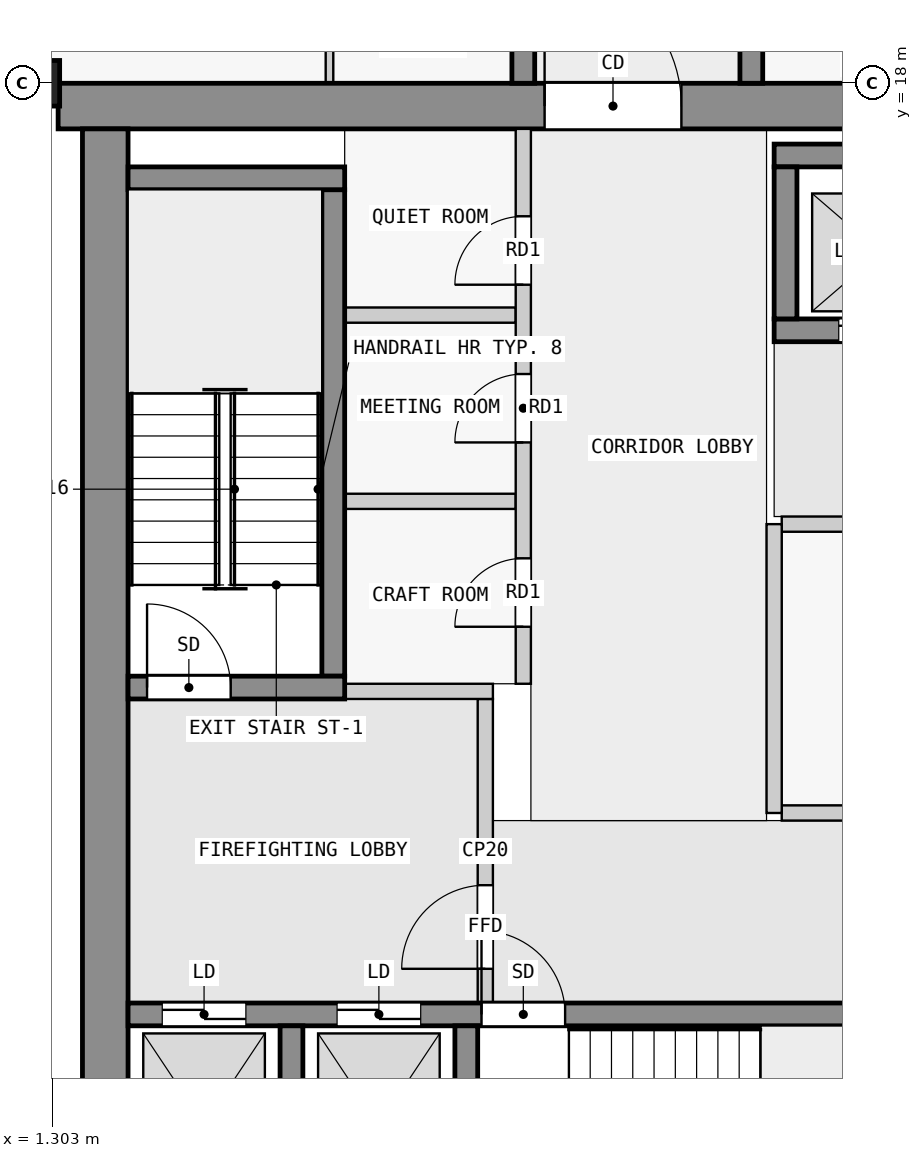
"""IFC4 building model, lengths in metres.
Left out: names, types, materials, properties, quantities, classifications, styles, units other than length and angle.
Written with IfcOpenShell. Run it as: python <this file> out.ifc"""

import sys

from ifc_helpers import new_model, si_unit, direction, frame, frame_2d, origin, origin_2d, place, context, subcontext, project, spatial, rectangle, extrude, element, fill, save


model = new_model("IFC4")
c1 = context("Model", 3, precision=1e-05, world=origin(), true_north=direction((0.0, 1.0)))
c2 = subcontext(c1, "Body", "Model", "MODEL_VIEW")
j1 = project(units=[si_unit("LENGTHUNIT", "METRE"), si_unit("PLANEANGLEUNIT", "RADIAN")], contexts=[c1])
p1 = place(None, origin())
s1 = spatial("IfcSite", under=j1, at=p1, CompositionType="ELEMENT")
p2 = place(p1, origin())
s2 = spatial("IfcBuilding", under=s1, at=p2, CompositionType="ELEMENT")
p3 = place(p2, frame((0.0, 0.0, 156.9)))
s3 = spatial("IfcBuildingStorey", under=s2, at=p3, CompositionType="ELEMENT", Elevation=156.9)
p4 = place(p3, frame((0.7, 18.0, 0.0), z_axis=(0.0, 0.0, 1.0), x_axis=(0.0, 1.0, 0.0)))
e1 = element("IfcColumn", 1, at=p4, inside=s3, PredefinedType="COLUMN", context=c2, shape_type="SweptSolid", body=[
    extrude(rectangle(XDim=0.6, YDim=1.4, at=origin_2d()), origin(), (0.0, 0.0, 1.0), 3.5),
])
p5 = place(p3, frame((1.38, 17.7, 0.0), z_axis=(0.0, 0.0, 1.0), x_axis=(1.0, 0.0, 0.0)))
e2 = element("IfcWall", 2, at=p5, inside=s3, PredefinedType="SHEAR", context=c2, shape_type="SweptSolid", body=[
    extrude(rectangle(XDim=21.12, YDim=0.6, at=frame_2d((10.56, 0.0))), origin(), (0.0, 0.0, 1.0), 3.25),
])
p6 = place(p5, frame((6.4, 0.0, 0.0)))
e3 = element("IfcOpeningElement", 3, at=p6, cuts=e2, PredefinedType="OPENING", context=c2, shape_type="SweptSolid", body=[
    extrude(rectangle(XDim=1.8, YDim=2.1, at=frame_2d((0.9, 1.05))), frame((0.0, 0.31, 0.0), z_axis=(0.0, -1.0, 0.0), x_axis=(1.0, 0.0, 0.0)), (0.0, 0.0, 1.0), 0.62),
])
p7 = place(p3, frame((2.0, 2.5, 0.0), z_axis=(0.0, 0.0, 1.0), x_axis=(0.0, 1.0, 0.0)))
e4 = element("IfcWall", 4, at=p7, inside=s3, PredefinedType="SHEAR", context=c2, shape_type="SweptSolid", body=[
    extrude(rectangle(XDim=14.9, YDim=0.6, at=frame_2d((7.45, 0.0))), origin(), (0.0, 0.0, 1.0), 3.25),
])
for number, where, z_axis, x_axis in (
    (5, (4.45, 2.8, 0.0), (0.0, 0.0, 1.0), (0.0, 1.0, 0.0)),
    (6, (6.75, 2.8, 0.0), (0.0, 0.0, 1.0), (0.0, 1.0, 0.0)),
):
    element("IfcWall", number, at=place(p3, frame(where, z_axis=z_axis, x_axis=x_axis)), inside=s3, PredefinedType="SHEAR", context=c2, shape_type="SweptSolid", body=[
        extrude(rectangle(XDim=2.8, YDim=0.3, at=frame_2d((1.4, 0.0))), origin(), (0.0, 0.0, 1.0), 3.25),
    ])
p8 = place(p3, frame((2.3, 5.75, 0.0), z_axis=(0.0, 0.0, 1.0), x_axis=(1.0, 0.0, 0.0)))
e7 = element("IfcWall", 7, at=p8, inside=s3, PredefinedType="SHEAR", context=c2, shape_type="SweptSolid", body=[
    extrude(rectangle(XDim=18.8, YDim=0.3, at=frame_2d((9.4, 0.0))), origin(), (0.0, 0.0, 1.0), 3.25),
])
p9 = place(p8, frame((4.65, 0.0, 0.0)))
e8 = element("IfcOpeningElement", 8, at=p9, cuts=e7, PredefinedType="OPENING", context=c2, shape_type="SweptSolid", body=[
    extrude(rectangle(XDim=1.1, YDim=2.1, at=frame_2d((0.55, 1.05))), frame((0.0, 0.16, 0.0), z_axis=(0.0, -1.0, 0.0), x_axis=(1.0, 0.0, 0.0)), (0.0, 0.0, 1.0), 0.32),
])
p10 = place(p8, frame((0.45, 0.0, 0.0)))
e9 = element("IfcOpeningElement", 9, at=p10, cuts=e7, PredefinedType="OPENING", context=c2, shape_type="SweptSolid", body=[
    extrude(rectangle(XDim=1.1, YDim=2.1, at=frame_2d((0.55, 1.05))), frame((0.0, 0.16, 0.0), z_axis=(0.0, -1.0, 0.0), x_axis=(1.0, 0.0, 0.0)), (0.0, 0.0, 1.0), 0.32),
])
p11 = place(p8, frame((2.75, 0.0, 0.0)))
e10 = element("IfcOpeningElement", 10, at=p11, cuts=e7, PredefinedType="OPENING", context=c2, shape_type="SweptSolid", body=[
    extrude(rectangle(XDim=1.1, YDim=2.1, at=frame_2d((0.55, 1.05))), frame((0.0, 0.16, 0.0), z_axis=(0.0, -1.0, 0.0), x_axis=(1.0, 0.0, 0.0)), (0.0, 0.0, 1.0), 0.32),
])
p12 = place(p8, frame((14.45, 0.0, 0.0)))
e11 = element("IfcOpeningElement", 11, at=p12, cuts=e7, PredefinedType="OPENING", context=c2, shape_type="SweptSolid", body=[
    extrude(rectangle(XDim=0.9, YDim=2.1, at=frame_2d((0.45, 1.05))), frame((0.0, 0.16, 0.0), z_axis=(0.0, -1.0, 0.0), x_axis=(1.0, 0.0, 0.0)), (0.0, 0.0, 1.0), 0.32),
])
p13 = place(p3, frame((2.3, 10.05, 0.0), z_axis=(0.0, 0.0, 1.0), x_axis=(1.0, 0.0, 0.0)))
e12 = element("IfcWall", 12, at=p13, inside=s3, PredefinedType="SHEAR", context=c2, shape_type="SweptSolid", body=[
    extrude(rectangle(XDim=2.85, YDim=0.3, at=frame_2d((1.425, 0.0))), origin(), (0.0, 0.0, 1.0), 3.25),
])
p14 = place(p13, frame((0.25, 0.0, 0.0)))
e13 = element("IfcOpeningElement", 13, at=p14, cuts=e12, PredefinedType="OPENING", context=c2, shape_type="SweptSolid", body=[
    extrude(rectangle(XDim=1.1, YDim=2.1, at=frame_2d((0.55, 1.05))), frame((0.0, 0.16, 0.0), z_axis=(0.0, -1.0, 0.0), x_axis=(1.0, 0.0, 0.0)), (0.0, 0.0, 1.0), 0.32),
])
p15 = place(p3, frame((5.0, 10.2, 0.0), z_axis=(0.0, 0.0, 1.0), x_axis=(0.0, 1.0, 0.0)))
e14 = element("IfcWall", 14, at=p15, inside=s3, PredefinedType="SHEAR", context=c2, shape_type="SweptSolid", body=[
    extrude(rectangle(XDim=6.4, YDim=0.3, at=frame_2d((3.2, 0.0))), origin(), (0.0, 0.0, 1.0), 3.25),
])
p16 = place(p3, frame((2.3, 16.75, 0.0), z_axis=(0.0, 0.0, 1.0), x_axis=(1.0, 0.0, 0.0)))
e15 = element("IfcWall", 15, at=p16, inside=s3, PredefinedType="SHEAR", context=c2, shape_type="SweptSolid", body=[
    extrude(rectangle(XDim=2.85, YDim=0.3, at=frame_2d((1.425, 0.0))), origin(), (0.0, 0.0, 1.0), 3.25),
])
p17 = place(p3, frame((10.8, 17.05, 0.0), z_axis=(0.0, 0.0, 1.0), x_axis=(1.0, 0.0, 0.0)))
e16 = element("IfcWall", 16, at=p17, inside=s3, PredefinedType="SHEAR", context=c2, shape_type="SweptSolid", body=[
    extrude(rectangle(XDim=7.8, YDim=0.3, at=frame_2d((3.9, 0.0))), origin(), (0.0, 0.0, 1.0), 3.25),
])
p18 = place(p3, frame((10.8, 14.75, 0.0), z_axis=(0.0, 0.0, 1.0), x_axis=(1.0, 0.0, 0.0)))
e17 = element("IfcWall", 17, at=p18, inside=s3, PredefinedType="SHEAR", context=c2, shape_type="SweptSolid", body=[
    extrude(rectangle(XDim=7.8, YDim=0.3, at=frame_2d((3.9, 0.0))), origin(), (0.0, 0.0, 1.0), 3.25),
])
p19 = place(p18, frame((0.85, 0.0, 0.0)))
e18 = element("IfcOpeningElement", 18, at=p19, cuts=e17, PredefinedType="OPENING", context=c2, shape_type="SweptSolid", body=[
    extrude(rectangle(XDim=1.1, YDim=2.1, at=frame_2d((0.55, 1.05))), frame((0.0, 0.16, 0.0), z_axis=(0.0, -1.0, 0.0), x_axis=(1.0, 0.0, 0.0)), (0.0, 0.0, 1.0), 0.32),
])
p20 = place(p18, frame((3.35, 0.0, 0.0)))
e19 = element("IfcOpeningElement", 19, at=p20, cuts=e17, PredefinedType="OPENING", context=c2, shape_type="SweptSolid", body=[
    extrude(rectangle(XDim=1.1, YDim=2.1, at=frame_2d((0.55, 1.05))), frame((0.0, 0.16, 0.0), z_axis=(0.0, -1.0, 0.0), x_axis=(1.0, 0.0, 0.0)), (0.0, 0.0, 1.0), 0.32),
])
p21 = place(p18, frame((5.85, 0.0, 0.0)))
e20 = element("IfcOpeningElement", 20, at=p21, cuts=e17, PredefinedType="OPENING", context=c2, shape_type="SweptSolid", body=[
    extrude(rectangle(XDim=1.1, YDim=2.1, at=frame_2d((0.55, 1.05))), frame((0.0, 0.16, 0.0), z_axis=(0.0, -1.0, 0.0), x_axis=(1.0, 0.0, 0.0)), (0.0, 0.0, 1.0), 0.32),
])
p22 = place(p3, frame((10.95, 14.9, 0.0), z_axis=(0.0, 0.0, 1.0), x_axis=(0.0, 1.0, 0.0)))
e21 = element("IfcWall", 21, at=p22, inside=s3, PredefinedType="SHEAR", context=c2, shape_type="SweptSolid", body=[
    extrude(rectangle(XDim=2.0, YDim=0.3, at=frame_2d((1.0, 0.0))), origin(), (0.0, 0.0, 1.0), 3.25),
])
p23 = place(p3, frame((7.5, 18.0, 0.0), z_axis=(0.0, 0.0, 1.0), x_axis=(0.0, 1.0, 0.0)))
e22 = element("IfcWall", 22, at=p23, inside=s3, PredefinedType="SHEAR", context=c2, shape_type="SweptSolid", body=[
    extrude(rectangle(XDim=27.0, YDim=0.3, at=frame_2d((13.5, 0.0))), origin(), (0.0, 0.0, 1.0), 3.25),
])
p24 = place(p23, frame((1.75, 0.0, 0.0)))
e23 = element("IfcOpeningElement", 23, at=p24, cuts=e22, PredefinedType="OPENING", context=c2, shape_type="SweptSolid", body=[
    extrude(rectangle(XDim=1.0, YDim=2.1, at=frame_2d((0.5, 1.05))), frame((0.0, 0.16, 0.0), z_axis=(0.0, -1.0, 0.0), x_axis=(1.0, 0.0, 0.0)), (0.0, 0.0, 1.0), 0.32),
])
p25 = place(p23, frame((5.85, 0.0, 0.0)))
e24 = element("IfcOpeningElement", 24, at=p25, cuts=e22, PredefinedType="OPENING", context=c2, shape_type="SweptSolid", body=[
    extrude(rectangle(XDim=1.8, YDim=2.1, at=frame_2d((0.9, 1.05))), frame((0.0, 0.16, 0.0), z_axis=(0.0, -1.0, 0.0), x_axis=(1.0, 0.0, 0.0)), (0.0, 0.0, 1.0), 0.32),
])
p26 = place(p23, frame((13.05, 0.0, 0.0)))
e25 = element("IfcOpeningElement", 25, at=p26, cuts=e22, PredefinedType="OPENING", context=c2, shape_type="SweptSolid", body=[
    extrude(rectangle(XDim=1.0, YDim=2.1, at=frame_2d((0.5, 1.05))), frame((0.0, 0.16, 0.0), z_axis=(0.0, -1.0, 0.0), x_axis=(1.0, 0.0, 0.0)), (0.0, 0.0, 1.0), 0.32),
])
p27 = place(p23, frame((21.35, 0.0, 0.0)))
e26 = element("IfcOpeningElement", 26, at=p27, cuts=e22, PredefinedType="OPENING", context=c2, shape_type="SweptSolid", body=[
    extrude(rectangle(XDim=1.0, YDim=2.1, at=frame_2d((0.5, 1.05))), frame((0.0, 0.16, 0.0), z_axis=(0.0, -1.0, 0.0), x_axis=(1.0, 0.0, 0.0)), (0.0, 0.0, 1.0), 0.32),
])
p28 = place(p3, frame((10.5, 18.0, 0.0), z_axis=(0.0, 0.0, 1.0), x_axis=(0.0, 1.0, 0.0)))
e27 = element("IfcWall", 27, at=p28, inside=s3, PredefinedType="SHEAR", context=c2, shape_type="SweptSolid", body=[
    extrude(rectangle(XDim=27.0, YDim=0.3, at=frame_2d((13.5, 0.0))), origin(), (0.0, 0.0, 1.0), 3.25),
])
p29 = place(p28, frame((1.85, 0.0, 0.0)))
e28 = element("IfcOpeningElement", 28, at=p29, cuts=e27, PredefinedType="OPENING", context=c2, shape_type="SweptSolid", body=[
    extrude(rectangle(XDim=0.9, YDim=2.1, at=frame_2d((0.45, 1.05))), frame((0.0, 0.16, 0.0), z_axis=(0.0, -1.0, 0.0), x_axis=(1.0, 0.0, 0.0)), (0.0, 0.0, 1.0), 0.32),
])
p30 = place(p28, frame((6.25, 0.0, 0.0)))
e29 = element("IfcOpeningElement", 29, at=p30, cuts=e27, PredefinedType="OPENING", context=c2, shape_type="SweptSolid", body=[
    extrude(rectangle(XDim=1.0, YDim=2.1, at=frame_2d((0.5, 1.05))), frame((0.0, 0.16, 0.0), z_axis=(0.0, -1.0, 0.0), x_axis=(1.0, 0.0, 0.0)), (0.0, 0.0, 1.0), 0.32),
])
p31 = place(p28, frame((10.85, 0.0, 0.0)))
e30 = element("IfcOpeningElement", 30, at=p31, cuts=e27, PredefinedType="OPENING", context=c2, shape_type="SweptSolid", body=[
    extrude(rectangle(XDim=0.9, YDim=2.1, at=frame_2d((0.45, 1.05))), frame((0.0, 0.16, 0.0), z_axis=(0.0, -1.0, 0.0), x_axis=(1.0, 0.0, 0.0)), (0.0, 0.0, 1.0), 0.32),
])
p32 = place(p28, frame((17.55, 0.0, 0.0)))
e31 = element("IfcOpeningElement", 31, at=p32, cuts=e27, PredefinedType="OPENING", context=c2, shape_type="SweptSolid", body=[
    extrude(rectangle(XDim=1.0, YDim=2.1, at=frame_2d((0.5, 1.05))), frame((0.0, 0.16, 0.0), z_axis=(0.0, -1.0, 0.0), x_axis=(1.0, 0.0, 0.0)), (0.0, 0.0, 1.0), 0.32),
])
p33 = place(p28, frame((23.25, 0.0, 0.0)))
e32 = element("IfcOpeningElement", 32, at=p33, cuts=e27, PredefinedType="OPENING", context=c2, shape_type="SweptSolid", body=[
    extrude(rectangle(XDim=0.9, YDim=2.1, at=frame_2d((0.45, 1.05))), frame((0.0, 0.16, 0.0), z_axis=(0.0, -1.0, 0.0), x_axis=(1.0, 0.0, 0.0)), (0.0, 0.0, 1.0), 0.32),
])
p34 = place(p28, frame((25.45, 0.0, 0.0)))
e33 = element("IfcOpeningElement", 33, at=p34, cuts=e27, PredefinedType="OPENING", context=c2, shape_type="SweptSolid", body=[
    extrude(rectangle(XDim=1.0, YDim=2.1, at=frame_2d((0.5, 1.05))), frame((0.0, 0.16, 0.0), z_axis=(0.0, -1.0, 0.0), x_axis=(1.0, 0.0, 0.0)), (0.0, 0.0, 1.0), 0.32),
])
p35 = place(p3, frame((7.0, 5.9, 0.0), z_axis=(0.0, 0.0, 1.0), x_axis=(0.0, 1.0, 0.0)))
e34 = element("IfcWall", 34, at=p35, inside=s3, PredefinedType="PARTITIONING", context=c2, shape_type="SweptSolid", body=[
    extrude(rectangle(XDim=4.0, YDim=0.2, at=frame_2d((2.0, 0.0))), origin(), (0.0, 0.0, 1.0), 3.25),
])
p36 = place(p35, frame((0.45, 0.0, 0.0)))
e35 = element("IfcOpeningElement", 35, at=p36, cuts=e34, PredefinedType="OPENING", context=c2, shape_type="SweptSolid", body=[
    extrude(rectangle(XDim=1.1, YDim=2.1, at=frame_2d((0.55, 1.05))), frame((0.0, 0.11, 0.0), z_axis=(0.0, -1.0, 0.0), x_axis=(1.0, 0.0, 0.0)), (0.0, 0.0, 1.0), 0.22),
])
p37 = place(p3, frame((5.15, 10.0, 0.0), z_axis=(0.0, 0.0, 1.0), x_axis=(1.0, 0.0, 0.0)))
e36 = element("IfcWall", 36, at=p37, inside=s3, PredefinedType="PARTITIONING", context=c2, shape_type="SweptSolid", body=[
    extrude(rectangle(XDim=1.95, YDim=0.2, at=frame_2d((0.975, 0.0))), origin(), (0.0, 0.0, 1.0), 3.25),
])
p38 = place(p3, frame((10.8, 8.4, 0.0), z_axis=(0.0, 0.0, 1.0), x_axis=(0.0, 1.0, 0.0)))
e37 = element("IfcWall", 37, at=p38, inside=s3, PredefinedType="PARTITIONING", context=c2, shape_type="SweptSolid", body=[
    extrude(rectangle(XDim=3.8, YDim=0.2, at=frame_2d((1.9, 0.0))), origin(), (0.0, 0.0, 1.0), 3.25),
])
p39 = place(p3, frame((10.9, 8.4, 0.0), z_axis=(0.0, 0.0, 1.0), x_axis=(1.0, 0.0, 0.0)))
e38 = element("IfcWall", 38, at=p39, inside=s3, PredefinedType="PARTITIONING", context=c2, shape_type="SweptSolid", body=[
    extrude(rectangle(XDim=6.1, YDim=0.2, at=frame_2d((3.05, 0.0))), origin(), (0.0, 0.0, 1.0), 3.25),
])
p40 = place(p3, frame((10.9, 12.2, 0.0), z_axis=(0.0, 0.0, 1.0), x_axis=(1.0, 0.0, 0.0)))
e39 = element("IfcWall", 39, at=p40, inside=s3, PredefinedType="PARTITIONING", context=c2, shape_type="SweptSolid", body=[
    extrude(rectangle(XDim=6.1, YDim=0.2, at=frame_2d((3.05, 0.0))), origin(), (0.0, 0.0, 1.0), 3.25),
])
p41 = place(p40, frame((2.6, 0.0, 0.0)))
e40 = element("IfcOpeningElement", 40, at=p41, cuts=e39, PredefinedType="OPENING", context=c2, shape_type="SweptSolid", body=[
    extrude(rectangle(XDim=0.9, YDim=2.1, at=frame_2d((0.45, 1.05))), frame((0.0, 0.11, 0.0), z_axis=(0.0, -1.0, 0.0), x_axis=(1.0, 0.0, 0.0)), (0.0, 0.0, 1.0), 0.22),
])
p42 = place(p3, frame((7.5, 10.1, 0.0), z_axis=(0.0, 0.0, 1.0), x_axis=(0.0, 1.0, 0.0)))
e41 = element("IfcWall", 41, at=p42, inside=s3, PredefinedType="PARTITIONING", context=c2, shape_type="SweptSolid", body=[
    extrude(rectangle(XDim=7.3, YDim=0.2, at=frame_2d((3.65, 0.0))), origin(), (0.0, 0.0, 1.0), 3.25),
])
p43 = place(p42, frame((0.75, 0.0, 0.0)))
e42 = element("IfcOpeningElement", 42, at=p43, cuts=e41, PredefinedType="OPENING", context=c2, shape_type="SweptSolid", body=[
    extrude(rectangle(XDim=0.9, YDim=2.1, at=frame_2d((0.45, 1.05))), frame((0.0, 0.11, 0.0), z_axis=(0.0, -1.0, 0.0), x_axis=(1.0, 0.0, 0.0)), (0.0, 0.0, 1.0), 0.22),
])
p44 = place(p42, frame((3.175, 0.0, 0.0)))
e43 = element("IfcOpeningElement", 43, at=p44, cuts=e41, PredefinedType="OPENING", context=c2, shape_type="SweptSolid", body=[
    extrude(rectangle(XDim=0.9, YDim=2.1, at=frame_2d((0.45, 1.05))), frame((0.0, 0.11, 0.0), z_axis=(0.0, -1.0, 0.0), x_axis=(1.0, 0.0, 0.0)), (0.0, 0.0, 1.0), 0.22),
])
p45 = place(p42, frame((5.25, 0.0, 0.0)))
e44 = element("IfcOpeningElement", 44, at=p45, cuts=e41, PredefinedType="OPENING", context=c2, shape_type="SweptSolid", body=[
    extrude(rectangle(XDim=0.9, YDim=2.1, at=frame_2d((0.45, 1.05))), frame((0.0, 0.11, 0.0), z_axis=(0.0, -1.0, 0.0), x_axis=(1.0, 0.0, 0.0)), (0.0, 0.0, 1.0), 0.22),
])
for number, where, z_axis, x_axis in (
    (45, (5.15, 12.5, 0.0), (0.0, 0.0, 1.0), (1.0, 0.0, 0.0)),
    (46, (5.15, 14.95, 0.0), (0.0, 0.0, 1.0), (1.0, 0.0, 0.0)),
):
    element("IfcWall", number, at=place(p3, frame(where, z_axis=z_axis, x_axis=x_axis)), inside=s3, PredefinedType="PARTITIONING", context=c2, shape_type="SweptSolid", body=[
        extrude(rectangle(XDim=2.25, YDim=0.2, at=frame_2d((1.125, 0.0))), origin(), (0.0, 0.0, 1.0), 3.25),
    ])
p46 = place(p3, frame((4.95, 19.45, 0.0), z_axis=(0.0, 0.0, 1.0), x_axis=(0.0, -1.0, 0.0)))
e47 = element("IfcWall", 47, at=p46, inside=s3, PredefinedType="PARTITIONING", context=c2, shape_type="SweptSolid", body=[
    extrude(rectangle(XDim=1.45, YDim=0.1, at=frame_2d((0.725, 0.0))), origin(), (0.0, 0.0, 1.0), 3.25),
])
p47 = place(p36, origin())
e48 = element("IfcDoor", 48, at=p47, inside=s3, OperationType="SINGLE_SWING_LEFT", PredefinedType="DOOR", context=c2, shape_type="SweptSolid", body=[
    extrude(rectangle(XDim=1.1, YDim=2.1, at=frame_2d((0.55, 1.05))), frame((0.0, 0.025, 0.0), z_axis=(0.0, -1.0, 0.0), x_axis=(1.0, 0.0, 0.0)), (0.0, 0.0, 1.0), 0.05),
])
fill(e35, e48)
p48 = place(p14, origin())
e49 = element("IfcDoor", 49, at=p48, inside=s3, OperationType="SINGLE_SWING_RIGHT", PredefinedType="DOOR", context=c2, shape_type="SweptSolid", body=[
    extrude(rectangle(XDim=1.1, YDim=2.1, at=frame_2d((0.55, 1.05))), frame((0.0, 0.025, 0.0), z_axis=(0.0, -1.0, 0.0), x_axis=(1.0, 0.0, 0.0)), (0.0, 0.0, 1.0), 0.05),
])
fill(e13, e49)
p49 = place(p9, origin())
e50 = element("IfcDoor", 50, at=p49, inside=s3, OperationType="SINGLE_SWING_LEFT", PredefinedType="DOOR", context=c2, shape_type="SweptSolid", body=[
    extrude(rectangle(XDim=1.1, YDim=2.1, at=frame_2d((0.55, 1.05))), frame((0.0, 0.025, 0.0), z_axis=(0.0, -1.0, 0.0), x_axis=(1.0, 0.0, 0.0)), (0.0, 0.0, 1.0), 0.05),
])
fill(e8, e50)
p50 = place(p10, origin())
e51 = element("IfcDoor", 51, at=p50, inside=s3, OperationType="DOUBLE_DOOR_SLIDING", PredefinedType="DOOR", context=c2, shape_type="SweptSolid", body=[
    extrude(rectangle(XDim=1.1, YDim=2.1, at=frame_2d((0.55, 1.05))), frame((0.0, 0.025, 0.0), z_axis=(0.0, -1.0, 0.0), x_axis=(1.0, 0.0, 0.0)), (0.0, 0.0, 1.0), 0.05),
])
fill(e9, e51)
p51 = place(p11, origin())
e52 = element("IfcDoor", 52, at=p51, inside=s3, OperationType="DOUBLE_DOOR_SLIDING", PredefinedType="DOOR", context=c2, shape_type="SweptSolid", body=[
    extrude(rectangle(XDim=1.1, YDim=2.1, at=frame_2d((0.55, 1.05))), frame((0.0, 0.025, 0.0), z_axis=(0.0, -1.0, 0.0), x_axis=(1.0, 0.0, 0.0)), (0.0, 0.0, 1.0), 0.05),
])
fill(e10, e52)
p52 = place(p19, origin())
e53 = element("IfcDoor", 53, at=p52, inside=s3, OperationType="DOUBLE_DOOR_SLIDING", PredefinedType="DOOR", context=c2, shape_type="SweptSolid", body=[
    extrude(rectangle(XDim=1.1, YDim=2.1, at=frame_2d((0.55, 1.05))), frame((0.0, 0.025, 0.0), z_axis=(0.0, -1.0, 0.0), x_axis=(1.0, 0.0, 0.0)), (0.0, 0.0, 1.0), 0.05),
])
fill(e18, e53)
p53 = place(p6, origin())
e54 = element("IfcDoor", 54, at=p53, inside=s3, OperationType="DOUBLE_DOOR_SINGLE_SWING", PredefinedType="DOOR", context=c2, shape_type="SweptSolid", body=[
    extrude(rectangle(XDim=1.8, YDim=2.1, at=frame_2d((0.9, 1.05))), frame((0.0, 0.025, 0.0), z_axis=(0.0, -1.0, 0.0), x_axis=(1.0, 0.0, 0.0)), (0.0, 0.0, 1.0), 0.05),
])
fill(e3, e54)
p54 = place(p43, origin())
e55 = element("IfcDoor", 55, at=p54, inside=s3, OperationType="SINGLE_SWING_RIGHT", PredefinedType="DOOR", context=c2, shape_type="SweptSolid", body=[
    extrude(rectangle(XDim=0.9, YDim=2.1, at=frame_2d((0.45, 1.05))), frame((0.0, 0.025, 0.0), z_axis=(0.0, -1.0, 0.0), x_axis=(1.0, 0.0, 0.0)), (0.0, 0.0, 1.0), 0.05),
])
fill(e42, e55)
p55 = place(p44, origin())
e56 = element("IfcDoor", 56, at=p55, inside=s3, OperationType="SINGLE_SWING_RIGHT", PredefinedType="DOOR", context=c2, shape_type="SweptSolid", body=[
    extrude(rectangle(XDim=0.9, YDim=2.1, at=frame_2d((0.45, 1.05))), frame((0.0, 0.025, 0.0), z_axis=(0.0, -1.0, 0.0), x_axis=(1.0, 0.0, 0.0)), (0.0, 0.0, 1.0), 0.05),
])
fill(e43, e56)
p56 = place(p45, origin())
e57 = element("IfcDoor", 57, at=p56, inside=s3, OperationType="SINGLE_SWING_RIGHT", PredefinedType="DOOR", context=c2, shape_type="SweptSolid", body=[
    extrude(rectangle(XDim=0.9, YDim=2.1, at=frame_2d((0.45, 1.05))), frame((0.0, 0.025, 0.0), z_axis=(0.0, -1.0, 0.0), x_axis=(1.0, 0.0, 0.0)), (0.0, 0.0, 1.0), 0.05),
])
fill(e44, e57)
save(model, sys.argv[1])
